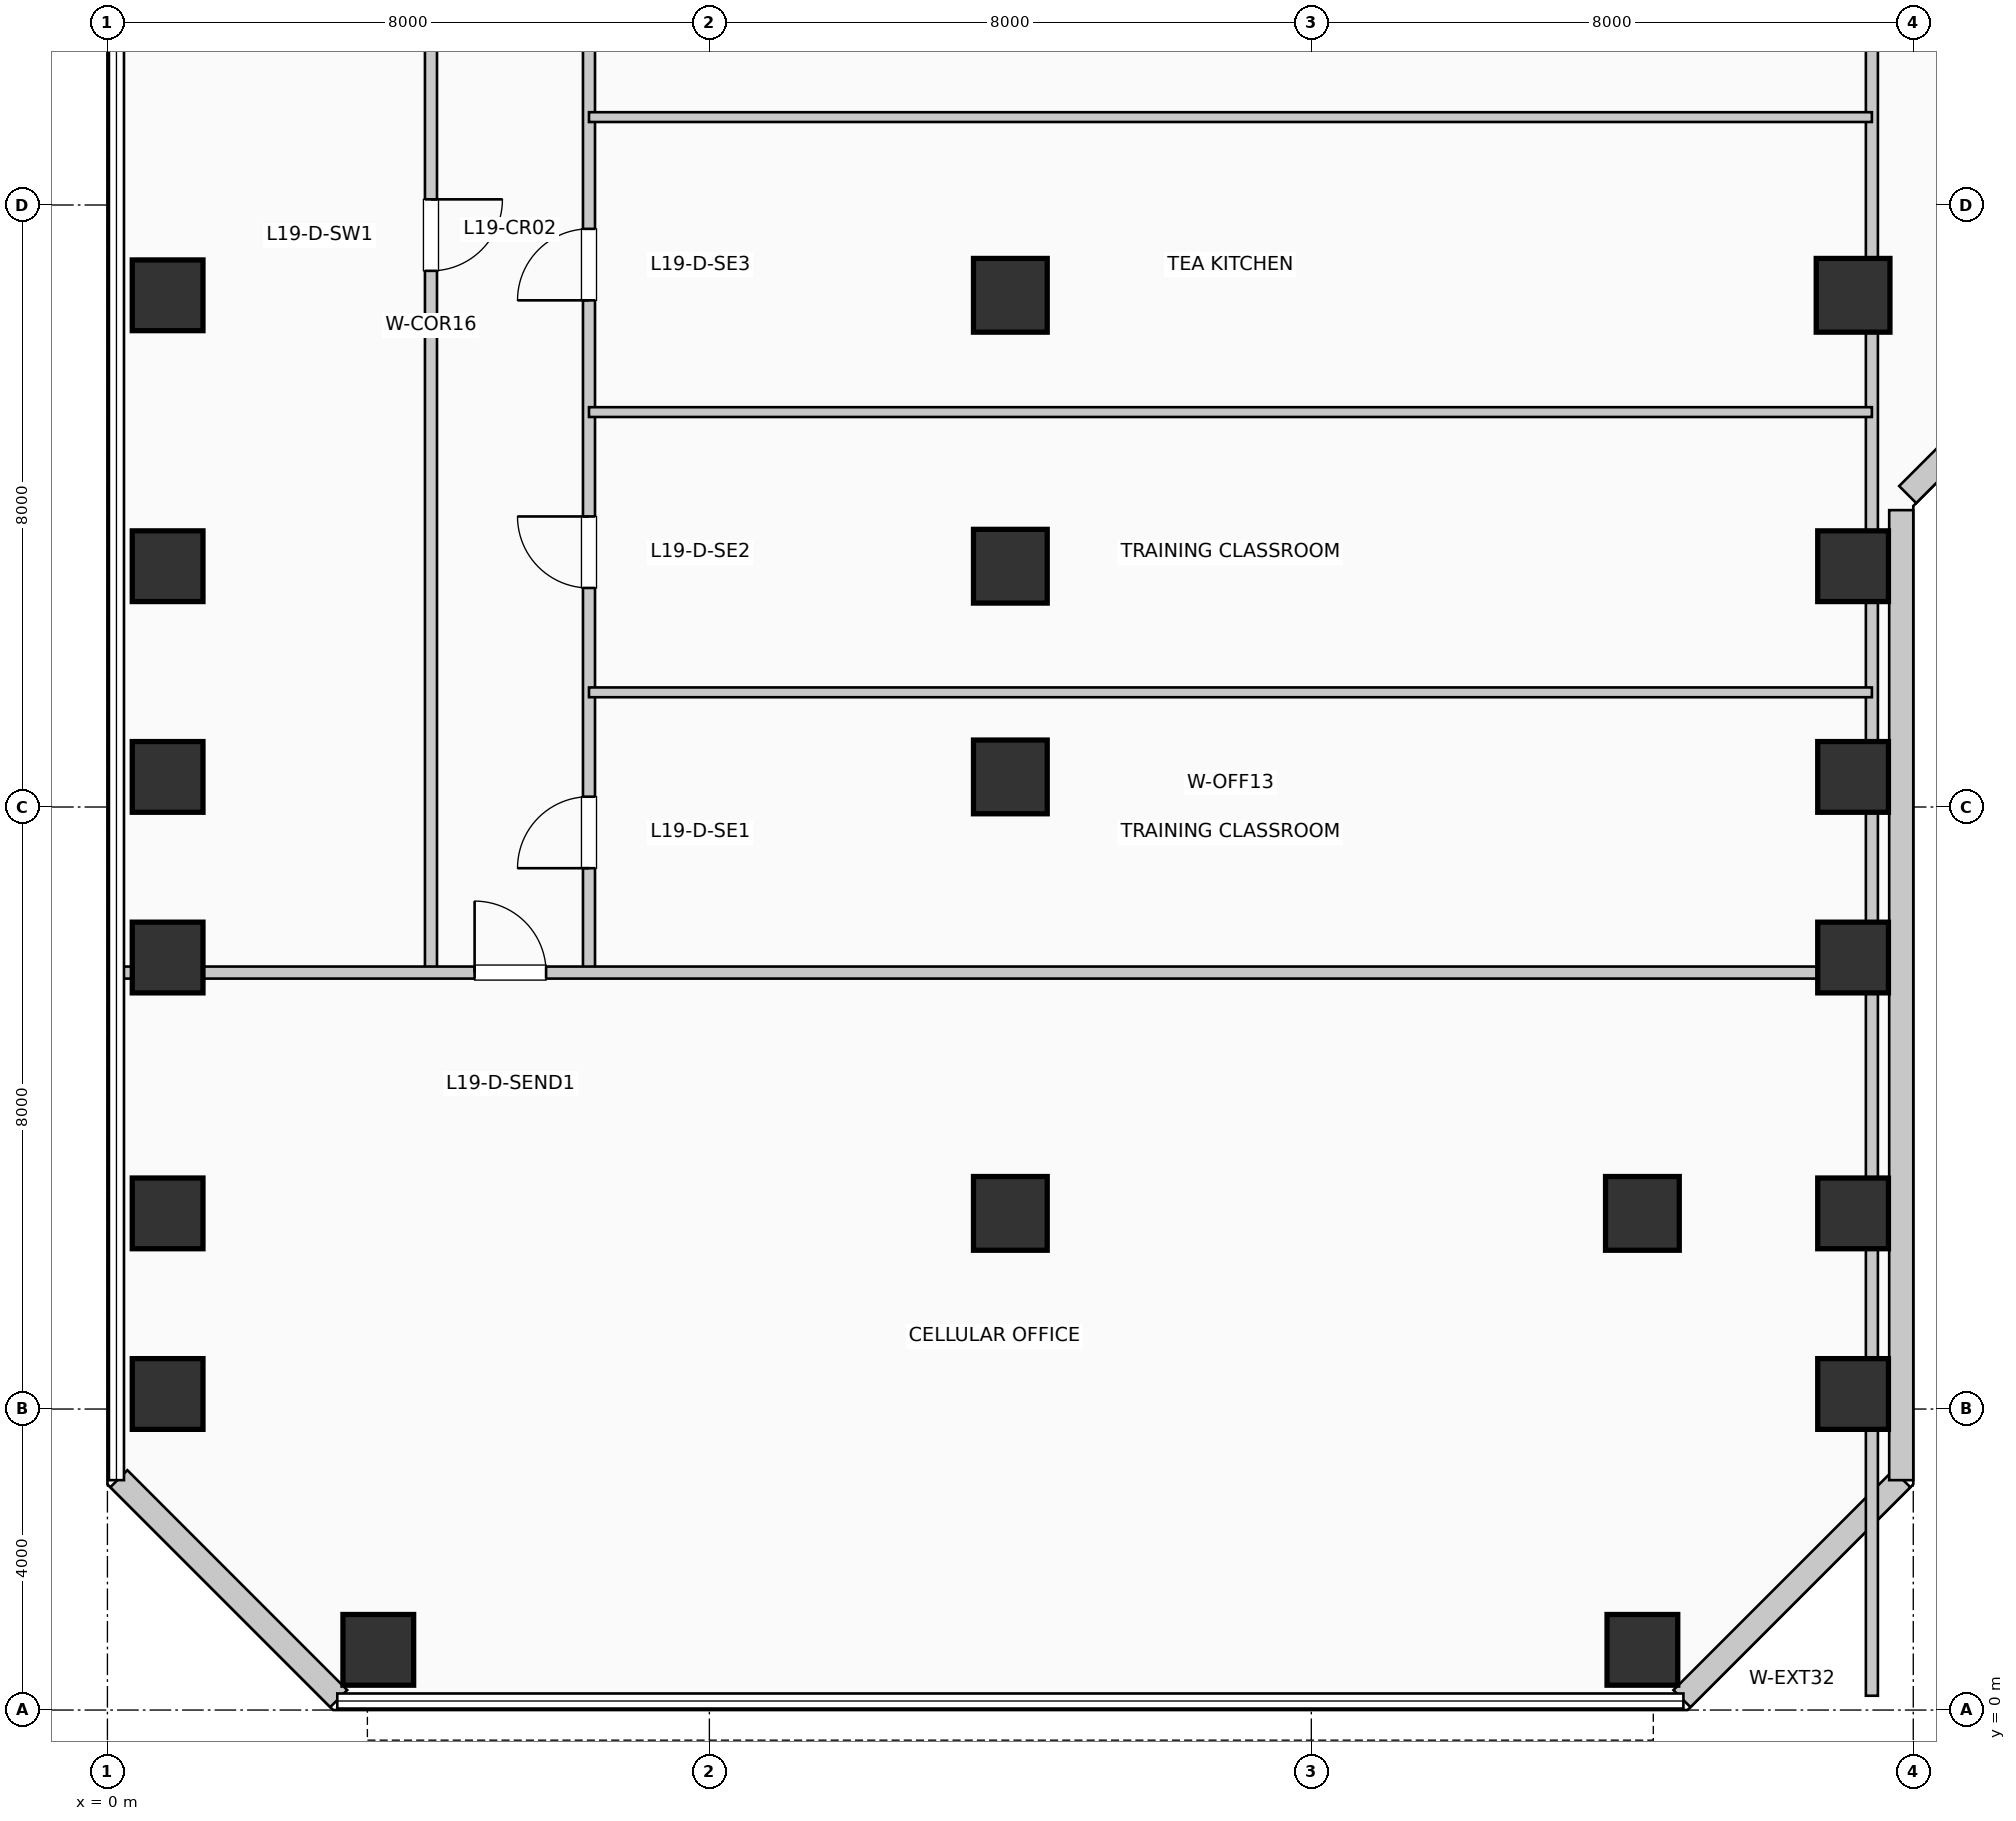
"""IFC4 building model, lengths in metres.
Left out: names, types, materials, properties, quantities, classifications, styles, units other than length and angle.
Written with IfcOpenShell. Run it as: python <this file> out.ifc"""

import sys

from ifc_helpers import new_model, si_unit, direction, frame, frame_2d, origin, origin_2d, place, context, subcontext, project, spatial, rectangle, extrude, element, fill, save


model = new_model("IFC4")
c1 = context("Model", 3, precision=1e-05, world=origin(), true_north=direction((0.0, 1.0)))
c2 = subcontext(c1, "Body", "Model", "MODEL_VIEW")
j1 = project(units=[si_unit("LENGTHUNIT", "METRE"), si_unit("PLANEANGLEUNIT", "RADIAN")], contexts=[c1])
p1 = place(None, origin())
s1 = spatial("IfcSite", under=j1, at=p1, CompositionType="ELEMENT")
p2 = place(p1, origin())
s2 = spatial("IfcBuilding", under=s1, at=p2, CompositionType="ELEMENT")
p3 = place(p2, frame((0.0, 0.0, 81.84)))
s3 = spatial("IfcBuildingStorey", under=s2, at=p3, CompositionType="ELEMENT", Elevation=81.84)
for number, where, z_axis, x_axis in (
    (1, (0.8, 4.2, 0.0), (0.0, 0.0, 1.0), (1.0, 0.0, 0.0)),
    (2, (0.8, 6.6, 0.0), (0.0, 0.0, 1.0), (1.0, 0.0, 0.0)),
    (3, (0.8, 10.0, 0.0), (0.0, 0.0, 1.0), (1.0, 0.0, 0.0)),
    (4, (0.8, 12.4, 0.0), (0.0, 0.0, 1.0), (1.0, 0.0, 0.0)),
    (5, (0.8, 15.2, 0.0), (0.0, 0.0, 1.0), (1.0, 0.0, 0.0)),
    (6, (0.8, 18.8, 0.0), (0.0, 0.0, 1.0), (1.0, 0.0, 0.0)),
    (7, (3.6, 0.8, 0.0), (0.0, 0.0, 1.0), (1.0, 0.0, 0.0)),
):
    element("IfcColumn", number, at=place(p3, frame(where, z_axis=z_axis, x_axis=x_axis)), inside=s3, PredefinedType="COLUMN", context=c2, shape_type="SweptSolid", body=[
        extrude(rectangle(XDim=0.94, YDim=0.94, at=origin_2d()), origin(), (0.0, 0.0, 1.0), 3.96),
    ])
for number, where, z_axis, x_axis in (
    (8, (12.0, 6.6, 0.0), (0.0, 0.0, 1.0), (1.0, 0.0, 0.0)),
    (9, (12.0, 12.4, 0.0), (0.0, 0.0, 1.0), (1.0, 0.0, 0.0)),
    (10, (12.0, 15.2, 0.0), (0.0, 0.0, 1.0), (1.0, 0.0, 0.0)),
    (11, (12.0, 18.8, 0.0), (0.0, 0.0, 1.0), (1.0, 0.0, 0.0)),
):
    element("IfcColumn", number, at=place(p3, frame(where, z_axis=z_axis, x_axis=x_axis)), inside=s3, PredefinedType="COLUMN", context=c2, shape_type="SweptSolid", body=[
        extrude(rectangle(XDim=0.98, YDim=0.98, at=origin_2d()), origin(), (0.0, 0.0, 1.0), 3.96),
    ])
p4 = place(p3, frame((20.4, 0.8, 0.0), z_axis=(0.0, 0.0, 1.0), x_axis=(1.0, 0.0, 0.0)))
e12 = element("IfcColumn", 12, at=p4, inside=s3, PredefinedType="COLUMN", context=c2, shape_type="SweptSolid", body=[
    extrude(rectangle(XDim=0.94, YDim=0.94, at=origin_2d()), origin(), (0.0, 0.0, 1.0), 3.96),
])
p5 = place(p3, frame((20.4, 6.6, 0.0), z_axis=(0.0, 0.0, 1.0), x_axis=(1.0, 0.0, 0.0)))
e13 = element("IfcColumn", 13, at=p5, inside=s3, PredefinedType="COLUMN", context=c2, shape_type="SweptSolid", body=[
    extrude(rectangle(XDim=0.98, YDim=0.98, at=origin_2d()), origin(), (0.0, 0.0, 1.0), 3.96),
])
for number, where, z_axis, x_axis in (
    (14, (23.2, 4.2, 0.0), (0.0, 0.0, 1.0), (1.0, 0.0, 0.0)),
    (15, (23.2, 6.6, 0.0), (0.0, 0.0, 1.0), (1.0, 0.0, 0.0)),
    (16, (23.2, 10.0, 0.0), (0.0, 0.0, 1.0), (1.0, 0.0, 0.0)),
    (17, (23.2, 12.4, 0.0), (0.0, 0.0, 1.0), (1.0, 0.0, 0.0)),
    (18, (23.2, 15.2, 0.0), (0.0, 0.0, 1.0), (1.0, 0.0, 0.0)),
):
    element("IfcColumn", number, at=place(p3, frame(where, z_axis=z_axis, x_axis=x_axis)), inside=s3, PredefinedType="COLUMN", context=c2, shape_type="SweptSolid", body=[
        extrude(rectangle(XDim=0.94, YDim=0.94, at=origin_2d()), origin(), (0.0, 0.0, 1.0), 3.96),
    ])
p6 = place(p3, frame((23.2, 18.8, 0.0), z_axis=(0.0, 0.0, 1.0), x_axis=(1.0, 0.0, 0.0)))
e19 = element("IfcColumn", 19, at=p6, inside=s3, PredefinedType="COLUMN", context=c2, shape_type="SweptSolid", body=[
    extrude(rectangle(XDim=0.98, YDim=0.98, at=origin_2d()), origin(), (0.0, 0.0, 1.0), 3.96),
])
p7 = place(p3, frame((20.926, 0.152, 0.0), z_axis=(0.0, 0.0, 1.0), x_axis=(0.707106781187, 0.707106781187, 0.0)))
e20 = element("IfcWall", 20, at=p7, inside=s3, PredefinedType="SOLIDWALL", context=c2, shape_type="SweptSolid", body=[
    extrude(rectangle(XDim=4.133, YDim=0.32, at=frame_2d((2.066, 0.0))), origin(), (0.0, 0.0, 1.0), 3.71),
])
p8 = place(p3, frame((23.84, 3.055, 0.0), z_axis=(0.0, 0.0, 1.0), x_axis=(0.0, 1.0, 0.0)))
e21 = element("IfcWall", 21, at=p8, inside=s3, PredefinedType="SOLIDWALL", context=c2, shape_type="SweptSolid", body=[
    extrude(rectangle(XDim=12.89, YDim=0.32, at=frame_2d((6.445, 0.0))), origin(), (0.0, 0.0, 1.0), 3.71),
])
p9 = place(p3, frame((23.926, 16.152, 0.0), z_axis=(0.0, 0.0, 1.0), x_axis=(0.707106781187, 0.707106781187, 0.0)))
e22 = element("IfcWall", 22, at=p9, inside=s3, PredefinedType="SOLIDWALL", context=c2, shape_type="SweptSolid", body=[
    extrude(rectangle(XDim=2.718, YDim=0.32, at=frame_2d((1.359, 0.0))), origin(), (0.0, 0.0, 1.0), 3.71),
])
p10 = place(p3, frame((0.152, 3.074, 0.0), z_axis=(0.0, 0.0, 1.0), x_axis=(0.707106781187, -0.707106781187, 0.0)))
e23 = element("IfcWall", 23, at=p10, inside=s3, PredefinedType="SOLIDWALL", context=c2, shape_type="SweptSolid", body=[
    extrude(rectangle(XDim=4.133, YDim=0.32, at=frame_2d((2.066, 0.0))), origin(), (0.0, 0.0, 1.0), 3.71),
])
p11 = place(p3, frame((4.3, 9.8, 0.0), z_axis=(0.0, 0.0, 1.0), x_axis=(0.0, 1.0, 0.0)))
e24 = element("IfcWall", 24, at=p11, inside=s3, PredefinedType="PARTITIONING", context=c2, shape_type="SweptSolid", body=[
    extrude(rectangle(XDim=19.6, YDim=0.16, at=frame_2d((9.8, 0.0))), origin(), (0.0, 0.0, 1.0), 3.71),
])
p12 = place(p11, frame((10.275, 0.0, 0.0), z_axis=(0.0, 0.0, 1.0), x_axis=(-1.0, 0.0, 0.0)))
e25 = element("IfcOpeningElement", 25, at=p12, cuts=e24, PredefinedType="OPENING", context=c2, shape_type="SweptSolid", body=[
    extrude(rectangle(XDim=0.95, YDim=2.15, at=frame_2d((0.475, 1.075))), frame((0.0, 0.09, 0.0), z_axis=(0.0, -1.0, 0.0), x_axis=(1.0, 0.0, 0.0)), (0.0, 0.0, 1.0), 0.18),
])
p13 = place(p3, frame((6.4, 9.8, 0.0), z_axis=(0.0, 0.0, 1.0), x_axis=(0.0, 1.0, 0.0)))
e26 = element("IfcWall", 26, at=p13, inside=s3, PredefinedType="PARTITIONING", context=c2, shape_type="SweptSolid", body=[
    extrude(rectangle(XDim=19.6, YDim=0.16, at=frame_2d((9.8, 0.0))), origin(), (0.0, 0.0, 1.0), 3.71),
])
p14 = place(p13, frame((1.387, 0.0, 0.0)))
e27 = element("IfcOpeningElement", 27, at=p14, cuts=e26, PredefinedType="OPENING", context=c2, shape_type="SweptSolid", body=[
    extrude(rectangle(XDim=0.95, YDim=2.15, at=frame_2d((0.475, 1.075))), frame((0.0, 0.09, 0.0), z_axis=(0.0, -1.0, 0.0), x_axis=(1.0, 0.0, 0.0)), (0.0, 0.0, 1.0), 0.18),
])
p15 = place(p13, frame((5.111, 0.0, 0.0)))
e28 = element("IfcOpeningElement", 28, at=p15, cuts=e26, PredefinedType="OPENING", context=c2, shape_type="SweptSolid", body=[
    extrude(rectangle(XDim=0.95, YDim=2.15, at=frame_2d((0.475, 1.075))), frame((0.0, 0.09, 0.0), z_axis=(0.0, -1.0, 0.0), x_axis=(1.0, 0.0, 0.0)), (0.0, 0.0, 1.0), 0.18),
])
p16 = place(p13, frame((8.933, 0.0, 0.0)))
e29 = element("IfcOpeningElement", 29, at=p16, cuts=e26, PredefinedType="OPENING", context=c2, shape_type="SweptSolid", body=[
    extrude(rectangle(XDim=0.95, YDim=2.15, at=frame_2d((0.475, 1.075))), frame((0.0, 0.09, 0.0), z_axis=(0.0, -1.0, 0.0), x_axis=(1.0, 0.0, 0.0)), (0.0, 0.0, 1.0), 0.18),
])
p17 = place(p13, frame((12.951, 0.0, 0.0)))
e30 = element("IfcOpeningElement", 30, at=p17, cuts=e26, PredefinedType="OPENING", context=c2, shape_type="SweptSolid", body=[
    extrude(rectangle(XDim=0.95, YDim=2.15, at=frame_2d((0.475, 1.075))), frame((0.0, 0.09, 0.0), z_axis=(0.0, -1.0, 0.0), x_axis=(1.0, 0.0, 0.0)), (0.0, 0.0, 1.0), 0.18),
])
p18 = place(p13, frame((17.067, 0.0, 0.0)))
e31 = element("IfcOpeningElement", 31, at=p18, cuts=e26, PredefinedType="OPENING", context=c2, shape_type="SweptSolid", body=[
    extrude(rectangle(XDim=0.95, YDim=2.15, at=frame_2d((0.475, 1.075))), frame((0.0, 0.09, 0.0), z_axis=(0.0, -1.0, 0.0), x_axis=(1.0, 0.0, 0.0)), (0.0, 0.0, 1.0), 0.18),
])
p19 = place(p3, frame((0.19, 9.8, 0.0), z_axis=(0.0, 0.0, 1.0), x_axis=(1.0, 0.0, 0.0)))
e32 = element("IfcWall", 32, at=p19, inside=s3, PredefinedType="PARTITIONING", context=c2, shape_type="SweptSolid", body=[
    extrude(rectangle(XDim=23.26, YDim=0.16, at=frame_2d((11.63, 0.0))), origin(), (0.0, 0.0, 1.0), 2.995),
])
p20 = place(p19, frame((4.69, 0.0, 0.0)))
e33 = element("IfcOpeningElement", 33, at=p20, cuts=e32, PredefinedType="OPENING", context=c2, shape_type="SweptSolid", body=[
    extrude(rectangle(XDim=0.95, YDim=2.15, at=frame_2d((0.475, 1.075))), frame((0.0, 0.09, 0.0), z_axis=(0.0, -1.0, 0.0), x_axis=(1.0, 0.0, 0.0)), (0.0, 0.0, 1.0), 0.18),
])
p21 = place(p3, frame((23.45, 0.19, 0.0), z_axis=(0.0, 0.0, 1.0), x_axis=(0.0, 1.0, 0.0)))
e34 = element("IfcWall", 34, at=p21, inside=s3, PredefinedType="PARTITIONING", context=c2, shape_type="SweptSolid", body=[
    extrude(rectangle(XDim=29.21, YDim=0.16, at=frame_2d((14.605, 0.0))), origin(), (0.0, 0.0, 1.0), 2.995),
])
for number, where, z_axis, x_axis in (
    (35, (6.4, 13.524, 0.0), (0.0, 0.0, 1.0), (1.0, 0.0, 0.0)),
    (36, (6.4, 17.248, 0.0), (0.0, 0.0, 1.0), (1.0, 0.0, 0.0)),
    (37, (6.4, 21.168, 0.0), (0.0, 0.0, 1.0), (1.0, 0.0, 0.0)),
):
    element("IfcWall", number, at=place(p3, frame(where, z_axis=z_axis, x_axis=x_axis)), inside=s3, PredefinedType="PARTITIONING", context=c2, shape_type="SweptSolid", body=[
        extrude(rectangle(XDim=17.05, YDim=0.13, at=frame_2d((8.525, 0.0))), origin(), (0.0, 0.0, 1.0), 3.71),
    ])
p22 = place(p20, origin())
e38 = element("IfcDoor", 38, at=p22, inside=s3, OperationType="SINGLE_SWING_LEFT", PredefinedType="DOOR", context=c2, shape_type="SweptSolid", body=[
    extrude(rectangle(XDim=0.95, YDim=2.15, at=frame_2d((0.475, 1.075))), frame((0.0, 0.025, 0.0), z_axis=(0.0, -1.0, 0.0), x_axis=(1.0, 0.0, 0.0)), (0.0, 0.0, 1.0), 0.05),
])
fill(e33, e38)
p23 = place(p12, origin())
e39 = element("IfcDoor", 39, at=p23, inside=s3, OperationType="SINGLE_SWING_RIGHT", PredefinedType="DOOR", context=c2, shape_type="SweptSolid", body=[
    extrude(rectangle(XDim=0.95, YDim=2.15, at=frame_2d((0.475, 1.075))), frame((0.0, 0.025, 0.0), z_axis=(0.0, -1.0, 0.0), x_axis=(1.0, 0.0, 0.0)), (0.0, 0.0, 1.0), 0.05),
])
fill(e25, e39)
p24 = place(p14, origin())
e40 = element("IfcDoor", 40, at=p24, inside=s3, OperationType="SINGLE_SWING_LEFT", PredefinedType="DOOR", context=c2, shape_type="SweptSolid", body=[
    extrude(rectangle(XDim=0.95, YDim=2.15, at=frame_2d((0.475, 1.075))), frame((0.0, 0.025, 0.0), z_axis=(0.0, -1.0, 0.0), x_axis=(1.0, 0.0, 0.0)), (0.0, 0.0, 1.0), 0.05),
])
fill(e27, e40)
p25 = place(p15, origin())
e41 = element("IfcDoor", 41, at=p25, inside=s3, OperationType="SINGLE_SWING_RIGHT", PredefinedType="DOOR", context=c2, shape_type="SweptSolid", body=[
    extrude(rectangle(XDim=0.95, YDim=2.15, at=frame_2d((0.475, 1.075))), frame((0.0, 0.025, 0.0), z_axis=(0.0, -1.0, 0.0), x_axis=(1.0, 0.0, 0.0)), (0.0, 0.0, 1.0), 0.05),
])
fill(e28, e41)
p26 = place(p16, origin())
e42 = element("IfcDoor", 42, at=p26, inside=s3, OperationType="SINGLE_SWING_LEFT", PredefinedType="DOOR", context=c2, shape_type="SweptSolid", body=[
    extrude(rectangle(XDim=0.95, YDim=2.15, at=frame_2d((0.475, 1.075))), frame((0.0, 0.025, 0.0), z_axis=(0.0, -1.0, 0.0), x_axis=(1.0, 0.0, 0.0)), (0.0, 0.0, 1.0), 0.05),
])
fill(e29, e42)
save(model, sys.argv[1])
